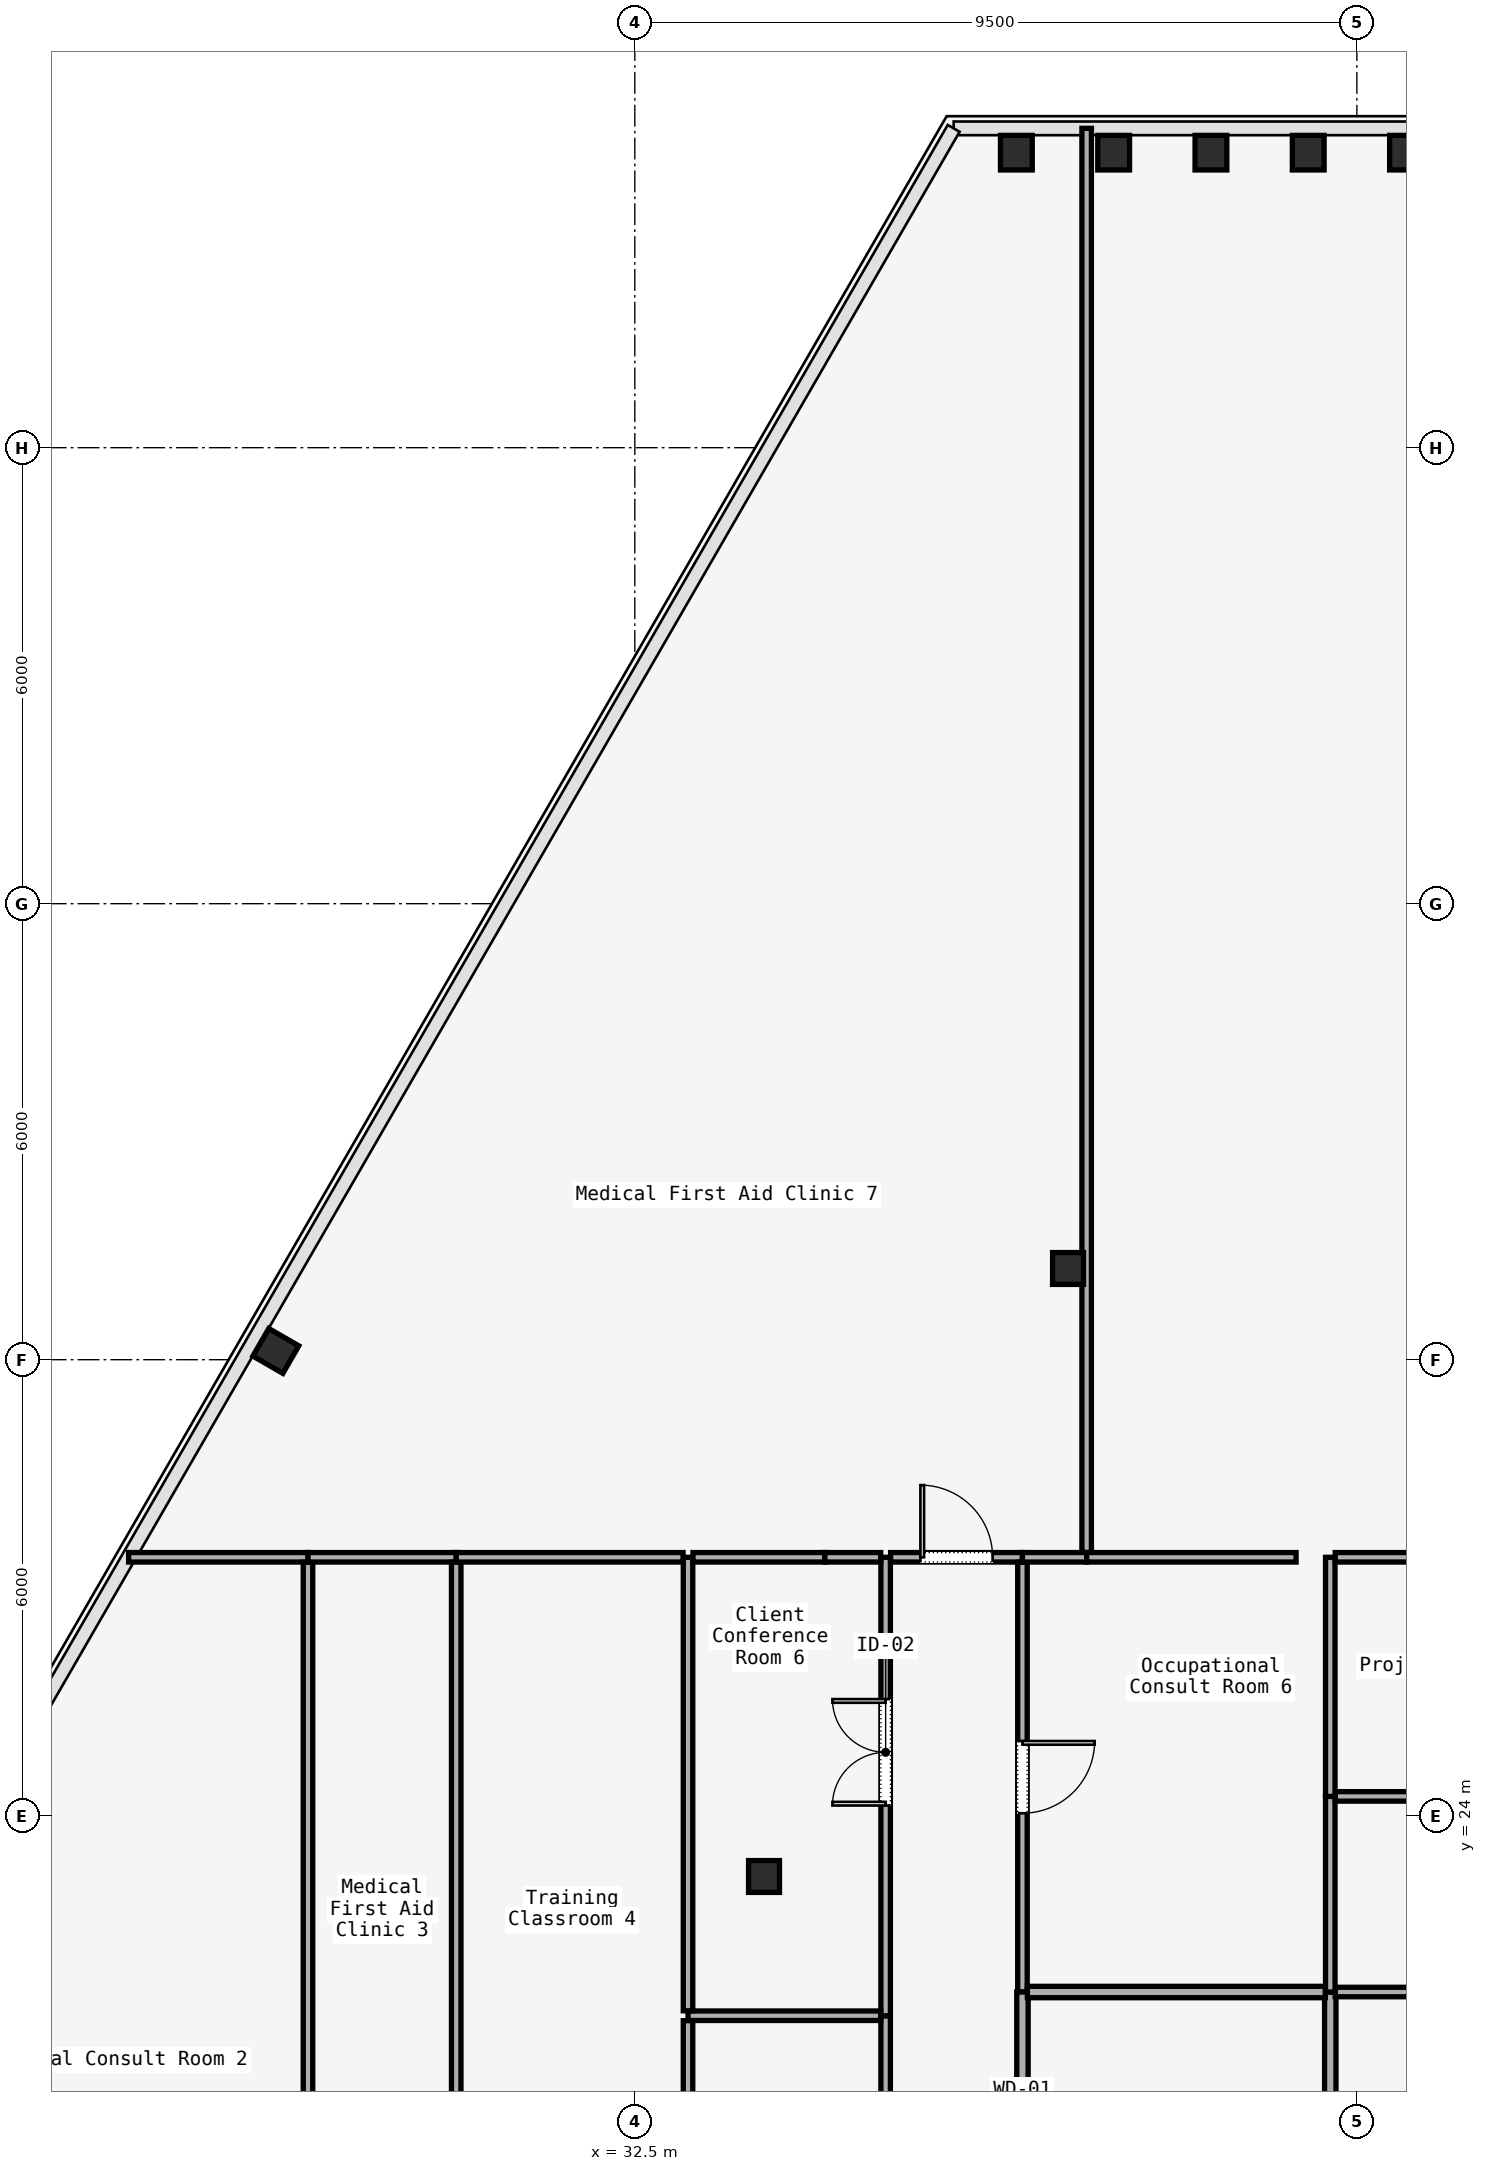
"""IFC4 building model, lengths in metres.
Left out: names, types, materials, properties, quantities, classifications, styles, units other than length and angle.
Written with IfcOpenShell. Run it as: python <this file> out.ifc"""

import sys

from ifc_helpers import new_model, si_unit, direction, frame, frame_2d, origin, origin_2d, place, context, subcontext, project, spatial, rectangle, i_section, extrude, element, fill, save


model = new_model("IFC4")
c1 = context("Model", 3, precision=1e-05, world=origin(), true_north=direction((0.0, 1.0)))
c2 = subcontext(c1, "Body", "Model", "MODEL_VIEW")
j1 = project(units=[si_unit("LENGTHUNIT", "METRE"), si_unit("PLANEANGLEUNIT", "RADIAN")], contexts=[c1])
p1 = place(None, origin())
s1 = spatial("IfcSite", under=j1, at=p1, CompositionType="ELEMENT")
p2 = place(p1, origin())
s2 = spatial("IfcBuilding", under=s1, at=p2, CompositionType="ELEMENT")
p3 = place(p2, frame((0.0, 0.0, 165.0)))
s3 = spatial("IfcBuildingStorey", under=s2, at=p3, CompositionType="ELEMENT", Elevation=165.0)
for number, where, z_axis, x_axis in (
    (1, (34.2, 23.2, 0.0), (0.0, 0.0, 1.0), (1.0, 0.0, 0.0)),
    (2, (38.2, 31.2, 0.0), (0.0, 0.0, 1.0), (1.0, 0.0, 0.0)),
):
    element("IfcColumn", number, at=place(p3, frame(where, z_axis=z_axis, x_axis=x_axis)), inside=s3, PredefinedType="COLUMN", context=c2, shape_type="SweptSolid", body=[
        extrude(i_section(OverallWidth=0.407, OverallDepth=0.419, WebThickness=0.031, FlangeThickness=0.049, FilletRadius=0.015, at=origin_2d()), origin(), (0.0, 0.0, 1.0), 3.58),
    ])
for number, where, z_axis, x_axis in (
    (3, (42.64, 45.882, 0.0), (0.0, 0.0, 1.0), (1.0, 0.0, 0.0)),
    (4, (41.36, 45.882, 0.0), (0.0, 0.0, 1.0), (1.0, 0.0, 0.0)),
    (5, (40.08, 45.882, 0.0), (0.0, 0.0, 1.0), (1.0, 0.0, 0.0)),
    (6, (38.8, 45.882, 0.0), (0.0, 0.0, 1.0), (1.0, 0.0, 0.0)),
    (7, (37.52, 45.882, 0.0), (0.0, 0.0, 1.0), (1.0, 0.0, 0.0)),
    (8, (27.777, 30.115, 0.0), (0.0, 0.0, 1.0), (0.5, 0.866, 0.0)),
):
    element("IfcColumn", number, at=place(p3, frame(where, z_axis=z_axis, x_axis=x_axis)), inside=s3, PredefinedType="COLUMN", context=c2, shape_type="SweptSolid", body=[
        extrude(i_section(OverallWidth=0.418, OverallDepth=0.455, WebThickness=0.042, FlangeThickness=0.052, FilletRadius=0.015, at=origin_2d()), origin(), (0.0, 0.0, 1.0), 3.58),
    ])
p4 = place(p3, frame((35.8, 17.065, 0.0), z_axis=(0.0, 0.0, 1.0), x_axis=(0.0, 1.0, 0.0)))
e9 = element("IfcWall", 9, at=p4, inside=s3, PredefinedType="PARTITIONING", context=c2, shape_type="SweptSolid", body=[
    extrude(rectangle(XDim=4.303, YDim=0.125, at=frame_2d((2.151, 0.0))), origin(), (0.0, 0.0, 1.0), 3.01),
])
p5 = place(p4, frame((1.677, 0.0, 0.0)))
e10 = element("IfcOpeningElement", 10, at=p5, cuts=e9, PredefinedType="OPENING", context=c2, shape_type="SweptSolid", body=[
    extrude(rectangle(XDim=0.95, YDim=2.2, at=frame_2d((0.475, 1.1))), frame((0.0, 0.062, 0.0), z_axis=(0.0, -1.0, 0.0), x_axis=(1.0, 0.0, 0.0)), (0.0, 0.0, 1.0), 0.125),
])
p6 = place(p3, frame((35.8, 21.368, 0.0), z_axis=(0.0, 0.0, 1.0), x_axis=(0.0, 1.0, 0.0)))
e11 = element("IfcWall", 11, at=p6, inside=s3, PredefinedType="PARTITIONING", context=c2, shape_type="SweptSolid", body=[
    extrude(rectangle(XDim=6.032, YDim=0.125, at=frame_2d((3.016, 0.0))), origin(), (0.0, 0.0, 1.0), 3.01),
])
p7 = place(p6, frame((2.766, 0.0, 0.0)))
e12 = element("IfcOpeningElement", 12, at=p7, cuts=e11, PredefinedType="OPENING", context=c2, shape_type="SweptSolid", body=[
    extrude(rectangle(XDim=1.4, YDim=2.2, at=frame_2d((0.7, 1.1))), frame((0.0, 0.062, 0.0), z_axis=(0.0, -1.0, 0.0), x_axis=(1.0, 0.0, 0.0)), (0.0, 0.0, 1.0), 0.125),
])
p8 = place(p3, frame((35.865, 27.4, 0.0), z_axis=(0.0, 0.0, 1.0), x_axis=(1.0, 0.0, 0.0)))
e13 = element("IfcWall", 13, at=p8, inside=s3, PredefinedType="PARTITIONING", context=c2, shape_type="SweptSolid", body=[
    extrude(rectangle(XDim=1.735, YDim=0.125, at=frame_2d((0.868, 0.0))), origin(), (0.0, 0.0, 1.0), 3.01),
])
p9 = place(p8, frame((0.393, 0.0, 0.0)))
e14 = element("IfcOpeningElement", 14, at=p9, cuts=e13, PredefinedType="OPENING", context=c2, shape_type="SweptSolid", body=[
    extrude(rectangle(XDim=0.95, YDim=2.2, at=frame_2d((0.475, 1.1))), frame((0.0, 0.062, 0.0), z_axis=(0.0, -1.0, 0.0), x_axis=(1.0, 0.0, 0.0)), (0.0, 0.0, 1.0), 0.125),
])
p10 = place(p3, frame((37.6, 27.335, 0.0), z_axis=(0.0, 0.0, 1.0), x_axis=(0.0, -1.0, 0.0)))
e15 = element("IfcWall", 15, at=p10, inside=s3, PredefinedType="PARTITIONING", context=c2, shape_type="SweptSolid", body=[
    extrude(rectangle(XDim=5.655, YDim=0.125, at=frame_2d((2.828, 0.0))), origin(), (0.0, 0.0, 1.0), 3.01),
])
p11 = place(p10, frame((2.353, 0.0, 0.0)))
e16 = element("IfcOpeningElement", 16, at=p11, cuts=e15, PredefinedType="OPENING", context=c2, shape_type="SweptSolid", body=[
    extrude(rectangle(XDim=0.95, YDim=2.2, at=frame_2d((0.475, 1.1))), frame((0.0, 0.062, 0.0), z_axis=(0.0, -1.0, 0.0), x_axis=(1.0, 0.0, 0.0)), (0.0, 0.0, 1.0), 0.125),
])
p12 = place(p3, frame((37.6, 21.68, 0.0), z_axis=(0.0, 0.0, 1.0), x_axis=(0.0, -1.0, 0.0)))
e17 = element("IfcWall", 17, at=p12, inside=s3, PredefinedType="PARTITIONING", context=c2, shape_type="SweptSolid", body=[
    extrude(rectangle(XDim=4.68, YDim=0.15, at=frame_2d((2.34, 0.0))), origin(), (0.0, 0.0, 1.0), 3.01),
])
p13 = place(p12, frame((1.89, 0.0, 0.0)))
e18 = element("IfcOpeningElement", 18, at=p13, cuts=e17, PredefinedType="OPENING", context=c2, shape_type="SweptSolid", body=[
    extrude(rectangle(XDim=0.9, YDim=2.15, at=frame_2d((0.45, 1.075))), frame((0.0, 0.075, 0.0), z_axis=(0.0, -1.0, 0.0), x_axis=(1.0, 0.0, 0.0)), (0.0, 0.0, 1.0), 0.15),
])
p14 = place(p3, frame((33.2, 21.368, 0.0), z_axis=(0.0, 0.0, 1.0), x_axis=(1.0, 0.0, 0.0)))
e19 = element("IfcWall", 19, at=p14, inside=s3, PredefinedType="PARTITIONING", context=c2, shape_type="SweptSolid", body=[
    extrude(rectangle(XDim=2.535, YDim=0.125, at=frame_2d((1.268, 0.0))), origin(), (0.0, 0.0, 1.0), 3.01),
])
p15 = place(p3, frame((33.2, 17.065, 0.0), z_axis=(0.0, 0.0, 1.0), x_axis=(0.0, 1.0, 0.0)))
e20 = element("IfcWall", 20, at=p15, inside=s3, PredefinedType="PARTITIONING", context=c2, shape_type="SweptSolid", body=[
    extrude(rectangle(XDim=4.238, YDim=0.125, at=frame_2d((2.119, 0.0))), origin(), (0.0, 0.0, 1.0), 3.01),
])
p16 = place(p3, frame((41.65, 21.68, 0.0), z_axis=(0.0, 0.0, 1.0), x_axis=(0.0, -1.0, 0.0)))
e21 = element("IfcWall", 21, at=p16, inside=s3, PredefinedType="PARTITIONING", context=c2, shape_type="SweptSolid", body=[
    extrude(rectangle(XDim=4.615, YDim=0.15, at=frame_2d((2.308, 0.0))), origin(), (0.0, 0.0, 1.0), 3.01),
])
p17 = place(p3, frame((37.665, 21.68, 0.0), z_axis=(0.0, 0.0, 1.0), x_axis=(1.0, 0.0, 0.0)))
e22 = element("IfcWall", 22, at=p17, inside=s3, PredefinedType="PARTITIONING", context=c2, shape_type="SweptSolid", body=[
    extrude(rectangle(XDim=3.92, YDim=0.15, at=frame_2d((1.96, 0.0))), origin(), (0.0, 0.0, 1.0), 3.01),
])
p18 = place(p3, frame((41.715, 21.68, 0.0), z_axis=(0.0, 0.0, 1.0), x_axis=(1.0, 0.0, 0.0)))
e23 = element("IfcWall", 23, at=p18, inside=s3, PredefinedType="PARTITIONING", context=c2, shape_type="SweptSolid", body=[
    extrude(rectangle(XDim=4.82, YDim=0.125, at=frame_2d((2.41, 0.0))), origin(), (0.0, 0.0, 1.0), 3.01),
])
p19 = place(p3, frame((25.84, 27.4, 0.0), z_axis=(0.0, 0.0, 1.0), x_axis=(1.0, 0.0, 0.0)))
e24 = element("IfcWall", 24, at=p19, inside=s3, PredefinedType="PARTITIONING", context=c2, shape_type="SweptSolid", body=[
    extrude(rectangle(XDim=2.36, YDim=0.125, at=frame_2d((1.18, 0.0))), origin(), (0.0, 0.0, 1.0), 3.01),
])
p20 = place(p3, frame((28.2, 27.335, 0.0), z_axis=(0.0, 0.0, 1.0), x_axis=(0.0, -1.0, 0.0)))
e25 = element("IfcWall", 25, at=p20, inside=s3, PredefinedType="PARTITIONING", context=c2, shape_type="SweptSolid", body=[
    extrude(rectangle(XDim=10.27, YDim=0.125, at=frame_2d((5.135, 0.0))), origin(), (0.0, 0.0, 1.0), 3.01),
])
p21 = place(p3, frame((28.2, 27.4, 0.0), z_axis=(0.0, 0.0, 1.0), x_axis=(1.0, 0.0, 0.0)))
e26 = element("IfcWall", 26, at=p21, inside=s3, PredefinedType="PARTITIONING", context=c2, shape_type="SweptSolid", body=[
    extrude(rectangle(XDim=1.95, YDim=0.125, at=frame_2d((0.975, 0.0))), origin(), (0.0, 0.0, 1.0), 3.01),
])
p22 = place(p3, frame((30.15, 27.335, 0.0), z_axis=(0.0, 0.0, 1.0), x_axis=(0.0, -1.0, 0.0)))
e27 = element("IfcWall", 27, at=p22, inside=s3, PredefinedType="PARTITIONING", context=c2, shape_type="SweptSolid", body=[
    extrude(rectangle(XDim=10.27, YDim=0.125, at=frame_2d((5.135, 0.0))), origin(), (0.0, 0.0, 1.0), 3.01),
])
p23 = place(p3, frame((33.2, 27.4, 0.0), z_axis=(0.0, 0.0, 1.0), x_axis=(0.0, -1.0, 0.0)))
e28 = element("IfcWall", 28, at=p23, inside=s3, PredefinedType="PARTITIONING", context=c2, shape_type="SweptSolid", body=[
    extrude(rectangle(XDim=5.967, YDim=0.125, at=frame_2d((2.983, 0.0))), origin(), (0.0, 0.0, 1.0), 3.01),
])
p24 = place(p3, frame((30.15, 27.4, 0.0), z_axis=(0.0, 0.0, 1.0), x_axis=(1.0, 0.0, 0.0)))
e29 = element("IfcWall", 29, at=p24, inside=s3, PredefinedType="PARTITIONING", context=c2, shape_type="SweptSolid", body=[
    extrude(rectangle(XDim=2.985, YDim=0.125, at=frame_2d((1.493, 0.0))), origin(), (0.0, 0.0, 1.0), 3.01),
])
p25 = place(p3, frame((41.65, 21.68, 0.0), z_axis=(0.0, 0.0, 1.0), x_axis=(0.0, 1.0, 0.0)))
e30 = element("IfcWall", 30, at=p25, inside=s3, PredefinedType="PARTITIONING", context=c2, shape_type="SweptSolid", body=[
    extrude(rectangle(XDim=2.574, YDim=0.125, at=frame_2d((1.287, 0.0))), origin(), (0.0, 0.0, 1.0), 3.01),
])
p26 = place(p3, frame((41.715, 24.254, 0.0), z_axis=(0.0, 0.0, 1.0), x_axis=(1.0, 0.0, 0.0)))
e31 = element("IfcWall", 31, at=p26, inside=s3, PredefinedType="PARTITIONING", context=c2, shape_type="SweptSolid", body=[
    extrude(rectangle(XDim=4.82, YDim=0.125, at=frame_2d((2.41, 0.0))), origin(), (0.0, 0.0, 1.0), 3.01),
])
p27 = place(p3, frame((33.265, 27.4, 0.0), z_axis=(0.0, 0.0, 1.0), x_axis=(1.0, 0.0, 0.0)))
e32 = element("IfcWall", 32, at=p27, inside=s3, PredefinedType="PARTITIONING", context=c2, shape_type="SweptSolid", body=[
    extrude(rectangle(XDim=1.735, YDim=0.125, at=frame_2d((0.868, 0.0))), origin(), (0.0, 0.0, 1.0), 3.01),
])
p28 = place(p3, frame((35.0, 27.4, 0.0), z_axis=(0.0, 0.0, 1.0), x_axis=(1.0, 0.0, 0.0)))
e33 = element("IfcWall", 33, at=p28, inside=s3, PredefinedType="PARTITIONING", context=c2, shape_type="SweptSolid", body=[
    extrude(rectangle(XDim=0.735, YDim=0.125, at=frame_2d((0.368, 0.0))), origin(), (0.0, 0.0, 1.0), 3.01),
])
p29 = place(p3, frame((41.65, 27.4, 0.0), z_axis=(0.0, 0.0, 1.0), x_axis=(0.0, -1.0, 0.0)))
e34 = element("IfcWall", 34, at=p29, inside=s3, PredefinedType="PARTITIONING", context=c2, shape_type="SweptSolid", body=[
    extrude(rectangle(XDim=3.146, YDim=0.125, at=frame_2d((1.573, 0.0))), origin(), (0.0, 0.0, 1.0), 3.01),
])
p30 = place(p3, frame((37.6, 27.4, 0.0), z_axis=(0.0, 0.0, 1.0), x_axis=(1.0, 0.0, 0.0)))
e35 = element("IfcWall", 35, at=p30, inside=s3, PredefinedType="PARTITIONING", context=c2, shape_type="SweptSolid", body=[
    extrude(rectangle(XDim=0.845, YDim=0.125, at=frame_2d((0.422, 0.0))), origin(), (0.0, 0.0, 1.0), 3.01),
])
p31 = place(p3, frame((38.445, 27.4, 0.0), z_axis=(0.0, 0.0, 1.0), x_axis=(1.0, 0.0, 0.0)))
e36 = element("IfcWall", 36, at=p31, inside=s3, PredefinedType="PARTITIONING", context=c2, shape_type="SweptSolid", body=[
    extrude(rectangle(XDim=2.755, YDim=0.125, at=frame_2d((1.377, 0.0))), origin(), (0.0, 0.0, 1.0), 3.01),
])
p32 = place(p3, frame((41.715, 27.4, 0.0), z_axis=(0.0, 0.0, 1.0), x_axis=(1.0, 0.0, 0.0)))
e37 = element("IfcWall", 37, at=p32, inside=s3, PredefinedType="PARTITIONING", context=c2, shape_type="SweptSolid", body=[
    extrude(rectangle(XDim=4.82, YDim=0.125, at=frame_2d((2.41, 0.0))), origin(), (0.0, 0.0, 1.0), 3.01),
])
p33 = place(p3, frame((38.445, 46.202, 0.0), z_axis=(0.0, 0.0, 1.0), x_axis=(0.0, -1.0, 0.0)))
e38 = element("IfcWall", 38, at=p33, inside=s3, PredefinedType="PARTITIONING", context=c2, shape_type="SweptSolid", body=[
    extrude(rectangle(XDim=18.737, YDim=0.125, at=frame_2d((9.368, 0.0))), origin(), (0.0, 0.0, 1.0), 3.01),
])
p34 = place(p7, origin())
e39 = element("IfcDoor", 39, at=p34, inside=s3, OperationType="SINGLE_SWING_RIGHT", PredefinedType="DOOR", context=c2, shape_type="SweptSolid", body=[
    extrude(rectangle(XDim=1.4, YDim=2.2, at=frame_2d((0.7, 1.1))), frame((0.0, 0.025, 0.0), z_axis=(0.0, -1.0, 0.0), x_axis=(1.0, 0.0, 0.0)), (0.0, 0.0, 1.0), 0.05),
])
fill(e12, e39)
p35 = place(p11, origin())
e40 = element("IfcDoor", 40, at=p35, inside=s3, OperationType="SINGLE_SWING_LEFT", PredefinedType="DOOR", context=c2, shape_type="SweptSolid", body=[
    extrude(rectangle(XDim=0.95, YDim=2.2, at=frame_2d((0.475, 1.1))), frame((0.0, 0.025, 0.0), z_axis=(0.0, -1.0, 0.0), x_axis=(1.0, 0.0, 0.0)), (0.0, 0.0, 1.0), 0.05),
])
fill(e16, e40)
p36 = place(p9, origin())
e41 = element("IfcDoor", 41, at=p36, inside=s3, OperationType="SINGLE_SWING_LEFT", PredefinedType="DOOR", context=c2, shape_type="SweptSolid", body=[
    extrude(rectangle(XDim=0.95, YDim=2.2, at=frame_2d((0.475, 1.1))), frame((0.0, 0.025, 0.0), z_axis=(0.0, -1.0, 0.0), x_axis=(1.0, 0.0, 0.0)), (0.0, 0.0, 1.0), 0.05),
])
fill(e14, e41)
save(model, sys.argv[1])
